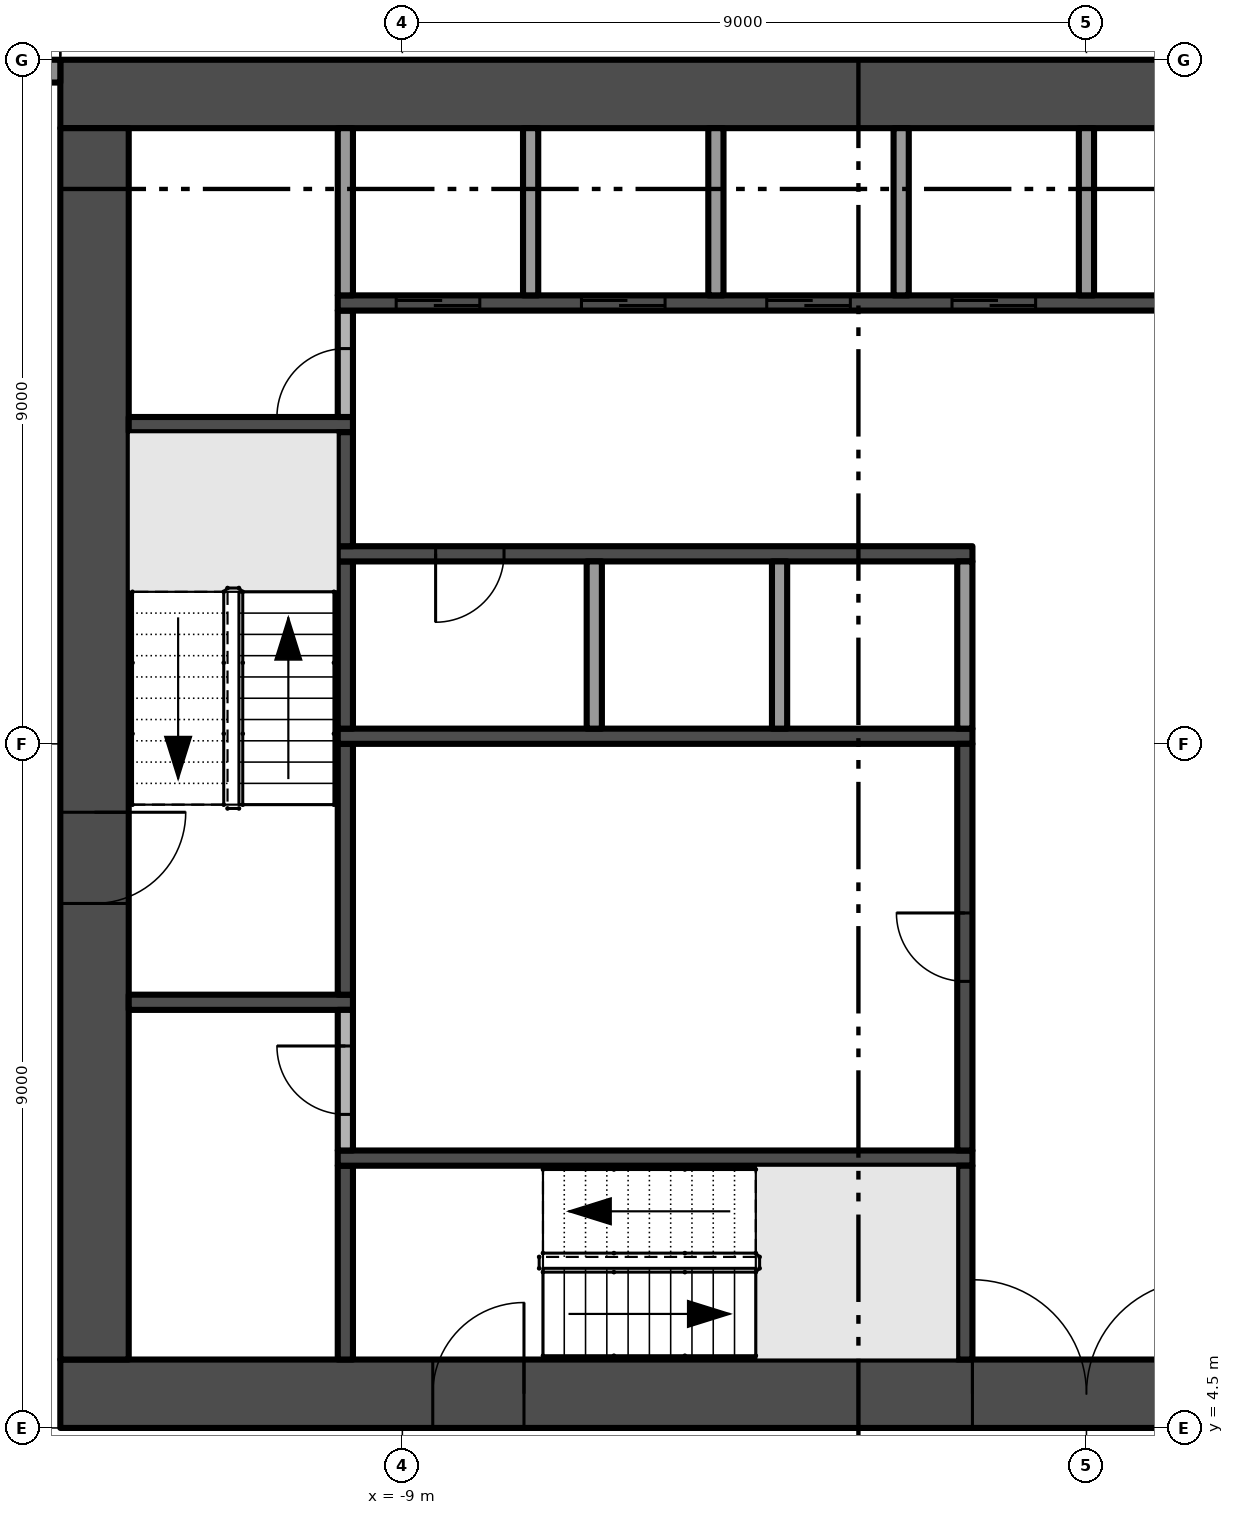
"""IFC4 building model, lengths in metres.
Left out: names, types, materials, properties, quantities, classifications, styles, units other than length and angle.
Written with IfcOpenShell. Run it as: python <this file> out.ifc"""

import sys

from ifc_helpers import new_model, si_unit, direction, frame, frame_2d, origin, place, context, subcontext, project, spatial, rectangle, extrude, element, fill, save


model = new_model("IFC4")
c1 = context("Model", 3, precision=1e-05, world=origin(), true_north=direction((0.0, 1.0)))
c2 = subcontext(c1, "Body", "Model", "MODEL_VIEW")
j1 = project(units=[si_unit("LENGTHUNIT", "METRE"), si_unit("PLANEANGLEUNIT", "RADIAN")], contexts=[c1])
p1 = place(None, origin())
s1 = spatial("IfcSite", under=j1, at=p1, CompositionType="ELEMENT")
p2 = place(p1, origin())
s2 = spatial("IfcBuilding", under=s1, at=p2, CompositionType="ELEMENT")
p3 = place(p2, frame((0.0, 0.0, 77.0)))
s3 = spatial("IfcBuildingStorey", under=s2, at=p3, CompositionType="ELEMENT", Elevation=77.0)
p4 = place(p3, frame((-13.5, 4.95, -0.3), z_axis=(0.0, 0.0, 1.0), x_axis=(1.0, 0.0, 0.0)))
e1 = element("IfcWall", 1, at=p4, inside=s3, PredefinedType="SHEAR", context=c2, shape_type="SweptSolid", body=[
    extrude(rectangle(XDim=27.0, YDim=0.9, at=frame_2d((13.5, 0.0))), origin(), (0.0, 0.0, 1.0), 3.8),
])
p5 = place(p4, frame((12.0, 0.0, 0.3)))
e2 = element("IfcOpeningElement", 2, at=p5, cuts=e1, PredefinedType="OPENING", context=c2, shape_type="SweptSolid", body=[
    extrude(rectangle(XDim=3.0, YDim=2.4, at=frame_2d((1.5, 1.2))), frame((0.0, 0.46, 0.0), z_axis=(0.0, -1.0, 0.0), x_axis=(1.0, 0.0, 0.0)), (0.0, 0.0, 1.0), 0.92),
])
p6 = place(p4, frame((4.9, 0.0, 0.3)))
e3 = element("IfcOpeningElement", 3, at=p6, cuts=e1, PredefinedType="OPENING", context=c2, shape_type="SweptSolid", body=[
    extrude(rectangle(XDim=1.2, YDim=2.2, at=frame_2d((0.6, 1.1))), frame((0.0, 0.46, 0.0), z_axis=(0.0, -1.0, 0.0), x_axis=(1.0, 0.0, 0.0)), (0.0, 0.0, 1.0), 0.92),
])
p7 = place(p4, frame((20.75, 0.0, 0.3)))
e4 = element("IfcOpeningElement", 4, at=p7, cuts=e1, PredefinedType="OPENING", context=c2, shape_type="SweptSolid", body=[
    extrude(rectangle(XDim=1.5, YDim=2.2, at=frame_2d((0.75, 1.1))), frame((0.0, 0.46, 0.0), z_axis=(0.0, -1.0, 0.0), x_axis=(1.0, 0.0, 0.0)), (0.0, 0.0, 1.0), 0.92),
])
p8 = place(p4, frame((17.4, 0.0, 0.3)))
e5 = element("IfcOpeningElement", 5, at=p8, cuts=e1, PredefinedType="OPENING", context=c2, shape_type="SweptSolid", body=[
    extrude(rectangle(XDim=1.2, YDim=2.2, at=frame_2d((0.6, 1.1))), frame((0.0, 0.46, 0.0), z_axis=(0.0, -1.0, 0.0), x_axis=(1.0, 0.0, 0.0)), (0.0, 0.0, 1.0), 0.92),
])
p9 = place(p3, frame((13.5, 22.05, -0.3), z_axis=(0.0, 0.0, 1.0), x_axis=(-1.0, 0.0, 0.0)))
e6 = element("IfcWall", 6, at=p9, inside=s3, PredefinedType="SHEAR", context=c2, shape_type="SweptSolid", body=[
    extrude(rectangle(XDim=27.0, YDim=0.9, at=frame_2d((13.5, 0.0))), origin(), (0.0, 0.0, 1.0), 3.8),
])
p10 = place(p3, frame((-13.05, 21.6, -0.3), z_axis=(0.0, 0.0, 1.0), x_axis=(0.0, -1.0, 0.0)))
e7 = element("IfcWall", 7, at=p10, inside=s3, PredefinedType="SHEAR", context=c2, shape_type="SweptSolid", body=[
    extrude(rectangle(XDim=16.2, YDim=0.9, at=frame_2d((8.1, 0.0))), origin(), (0.0, 0.0, 1.0), 3.8),
])
p11 = place(p10, frame((9.0, 0.0, 0.3)))
e8 = element("IfcOpeningElement", 8, at=p11, cuts=e7, PredefinedType="OPENING", context=c2, shape_type="SweptSolid", body=[
    extrude(rectangle(XDim=1.2, YDim=2.2, at=frame_2d((0.6, 1.1))), frame((0.0, 0.46, 0.0), z_axis=(0.0, -1.0, 0.0), x_axis=(1.0, 0.0, 0.0)), (0.0, 0.0, 1.0), 0.92),
])
p12 = place(p3, frame((-17.325, 22.35, 0.0), z_axis=(0.0, 0.0, 1.0), x_axis=(1.0, 0.0, 0.0)))
e9 = element("IfcWall", 9, at=p12, inside=s3, PredefinedType="SOLIDWALL", context=c2, shape_type="SweptSolid", body=[
    extrude(rectangle(XDim=3.825, YDim=0.3, at=frame_2d((1.913, 0.0))), origin(), (0.0, 0.0, 1.0), 3.5),
])
p13 = place(p12, frame((0.325, 0.0, 0.0)))
e10 = element("IfcOpeningElement", 10, at=p13, cuts=e9, PredefinedType="OPENING", context=c2, shape_type="SweptSolid", body=[
    extrude(rectangle(XDim=2.725, YDim=2.4, at=frame_2d((1.363, 1.2))), frame((0.0, 0.16, 0.0), z_axis=(0.0, -1.0, 0.0), x_axis=(1.0, 0.0, 0.0)), (0.0, 0.0, 1.0), 0.32),
])
for number, where, z_axis, x_axis in (
    (11, (-12.6, 10.1, 0.0), (0.0, 0.0, 1.0), (1.0, 0.0, 0.0)),
    (12, (-12.6, 17.7, 0.0), (0.0, 0.0, 1.0), (1.0, 0.0, 0.0)),
):
    element("IfcWall", number, at=place(p3, frame(where, z_axis=z_axis, x_axis=x_axis)), inside=s3, PredefinedType="SHEAR", context=c2, shape_type="SweptSolid", body=[
        extrude(rectangle(XDim=2.95, YDim=0.2, at=frame_2d((1.475, 0.0))), origin(), (0.0, 0.0, 1.0), 3.5),
    ])
p14 = place(p3, frame((-9.75, 5.4, 0.0), z_axis=(0.0, 0.0, 1.0), x_axis=(0.0, 1.0, 0.0)))
e13 = element("IfcWall", 13, at=p14, inside=s3, PredefinedType="SHEAR", context=c2, shape_type="SweptSolid", body=[
    extrude(rectangle(XDim=2.55, YDim=0.2, at=frame_2d((1.275, 0.0))), origin(), (0.0, 0.0, 1.0), 3.5),
])
p15 = place(p3, frame((-9.85, 8.05, 0.0), z_axis=(0.0, 0.0, 1.0), x_axis=(1.0, 0.0, 0.0)))
e14 = element("IfcWall", 14, at=p15, inside=s3, PredefinedType="SHEAR", context=c2, shape_type="SweptSolid", body=[
    extrude(rectangle(XDim=8.35, YDim=0.2, at=frame_2d((4.175, 0.0))), origin(), (0.0, 0.0, 1.0), 3.5),
])
p16 = place(p3, frame((-9.75, 8.15, 0.0), z_axis=(0.0, 0.0, 1.0), x_axis=(0.0, 1.0, 0.0)))
e15 = element("IfcWall", 15, at=p16, inside=s3, PredefinedType="PARTITIONING", context=c2, shape_type="SweptSolid", body=[
    extrude(rectangle(XDim=1.85, YDim=0.2, at=frame_2d((0.925, 0.0))), origin(), (0.0, 0.0, 1.0), 3.5),
])
p17 = place(p16, frame((0.475, 0.0, 0.0)))
e16 = element("IfcOpeningElement", 16, at=p17, cuts=e15, PredefinedType="OPENING", context=c2, shape_type="SweptSolid", body=[
    extrude(rectangle(XDim=0.9, YDim=2.1, at=frame_2d((0.45, 1.05))), frame((0.0, 0.11, 0.0), z_axis=(0.0, -1.0, 0.0), x_axis=(1.0, 0.0, 0.0)), (0.0, 0.0, 1.0), 0.22),
])
p18 = place(p3, frame((-9.75, 10.2, 0.0), z_axis=(0.0, 0.0, 1.0), x_axis=(0.0, 1.0, 0.0)))
e17 = element("IfcWall", 17, at=p18, inside=s3, PredefinedType="SHEAR", context=c2, shape_type="SweptSolid", body=[
    extrude(rectangle(XDim=3.3, YDim=0.2, at=frame_2d((1.65, 0.0))), origin(), (0.0, 0.0, 1.0), 3.5),
])
p19 = place(p3, frame((-9.85, 13.6, 0.0), z_axis=(0.0, 0.0, 1.0), x_axis=(1.0, 0.0, 0.0)))
e18 = element("IfcWall", 18, at=p19, inside=s3, PredefinedType="SHEAR", context=c2, shape_type="SweptSolid", body=[
    extrude(rectangle(XDim=8.35, YDim=0.2, at=frame_2d((4.175, 0.0))), origin(), (0.0, 0.0, 1.0), 3.5),
])
p20 = place(p3, frame((-9.75, 13.7, 0.0), z_axis=(0.0, 0.0, 1.0), x_axis=(0.0, 1.0, 0.0)))
e19 = element("IfcWall", 19, at=p20, inside=s3, PredefinedType="SHEAR", context=c2, shape_type="SweptSolid", body=[
    extrude(rectangle(XDim=2.2, YDim=0.2, at=frame_2d((1.1, 0.0))), origin(), (0.0, 0.0, 1.0), 3.5),
])
p21 = place(p3, frame((-1.5, 16.0, 0.0), z_axis=(0.0, 0.0, 1.0), x_axis=(-1.0, 0.0, 0.0)))
e20 = element("IfcWall", 20, at=p21, inside=s3, PredefinedType="SHEAR", context=c2, shape_type="SweptSolid", body=[
    extrude(rectangle(XDim=8.35, YDim=0.2, at=frame_2d((4.175, 0.0))), origin(), (0.0, 0.0, 1.0), 3.5),
])
p22 = place(p21, frame((6.162, 0.0, 0.0)))
e21 = element("IfcOpeningElement", 21, at=p22, cuts=e20, PredefinedType="OPENING", context=c2, shape_type="SweptSolid", body=[
    extrude(rectangle(XDim=0.9, YDim=2.1, at=frame_2d((0.45, 1.05))), frame((0.0, 0.11, 0.0), z_axis=(0.0, -1.0, 0.0), x_axis=(1.0, 0.0, 0.0)), (0.0, 0.0, 1.0), 0.22),
])
p23 = place(p3, frame((-9.75, 16.1, 0.0), z_axis=(0.0, 0.0, 1.0), x_axis=(0.0, 1.0, 0.0)))
e22 = element("IfcWall", 22, at=p23, inside=s3, PredefinedType="SHEAR", context=c2, shape_type="SweptSolid", body=[
    extrude(rectangle(XDim=1.5, YDim=0.2, at=frame_2d((0.75, 0.0))), origin(), (0.0, 0.0, 1.0), 3.5),
])
p24 = place(p3, frame((-9.75, 17.8, 0.0), z_axis=(0.0, 0.0, 1.0), x_axis=(0.0, 1.0, 0.0)))
e23 = element("IfcWall", 23, at=p24, inside=s3, PredefinedType="PARTITIONING", context=c2, shape_type="SweptSolid", body=[
    extrude(rectangle(XDim=1.4, YDim=0.2, at=frame_2d((0.7, 0.0))), origin(), (0.0, 0.0, 1.0), 3.5),
])
p25 = place(p24, origin())
e24 = element("IfcOpeningElement", 24, at=p25, cuts=e23, PredefinedType="OPENING", context=c2, shape_type="SweptSolid", body=[
    extrude(rectangle(XDim=0.9, YDim=2.1, at=frame_2d((0.45, 1.05))), frame((0.0, 0.11, 0.0), z_axis=(0.0, -1.0, 0.0), x_axis=(1.0, 0.0, 0.0)), (0.0, 0.0, 1.0), 0.22),
])
p26 = place(p3, frame((-9.85, 19.3, 0.0), z_axis=(0.0, 0.0, 1.0), x_axis=(1.0, 0.0, 0.0)))
e25 = element("IfcWall", 25, at=p26, inside=s3, PredefinedType="SHEAR", context=c2, shape_type="SweptSolid", body=[
    extrude(rectangle(XDim=19.7, YDim=0.2, at=frame_2d((9.85, 0.0))), origin(), (0.0, 0.0, 1.0), 3.5),
])
p27 = place(p26, frame((0.769, 0.0, 0.0)))
e26 = element("IfcOpeningElement", 26, at=p27, cuts=e25, PredefinedType="OPENING", context=c2, shape_type="SweptSolid", body=[
    extrude(rectangle(XDim=1.1, YDim=2.1, at=frame_2d((0.55, 1.05))), frame((0.0, 0.11, 0.0), z_axis=(0.0, -1.0, 0.0), x_axis=(1.0, 0.0, 0.0)), (0.0, 0.0, 1.0), 0.22),
])
p28 = place(p26, frame((3.206, 0.0, 0.0)))
e27 = element("IfcOpeningElement", 27, at=p28, cuts=e25, PredefinedType="OPENING", context=c2, shape_type="SweptSolid", body=[
    extrude(rectangle(XDim=1.1, YDim=2.1, at=frame_2d((0.55, 1.05))), frame((0.0, 0.11, 0.0), z_axis=(0.0, -1.0, 0.0), x_axis=(1.0, 0.0, 0.0)), (0.0, 0.0, 1.0), 0.22),
])
p29 = place(p26, frame((5.644, 0.0, 0.0)))
e28 = element("IfcOpeningElement", 28, at=p29, cuts=e25, PredefinedType="OPENING", context=c2, shape_type="SweptSolid", body=[
    extrude(rectangle(XDim=1.1, YDim=2.1, at=frame_2d((0.55, 1.05))), frame((0.0, 0.11, 0.0), z_axis=(0.0, -1.0, 0.0), x_axis=(1.0, 0.0, 0.0)), (0.0, 0.0, 1.0), 0.22),
])
p30 = place(p26, frame((8.081, 0.0, 0.0)))
e29 = element("IfcOpeningElement", 29, at=p30, cuts=e25, PredefinedType="OPENING", context=c2, shape_type="SweptSolid", body=[
    extrude(rectangle(XDim=1.1, YDim=2.1, at=frame_2d((0.55, 1.05))), frame((0.0, 0.11, 0.0), z_axis=(0.0, -1.0, 0.0), x_axis=(1.0, 0.0, 0.0)), (0.0, 0.0, 1.0), 0.22),
])
for number, where, z_axis, x_axis in (
    (30, (-9.75, 19.4, 0.0), (0.0, 0.0, 1.0), (0.0, 1.0, 0.0)),
    (31, (-7.312, 19.4, 0.0), (0.0, 0.0, 1.0), (0.0, 1.0, 0.0)),
    (32, (-6.475, 13.7, 0.0), (0.0, 0.0, 1.0), (0.0, 1.0, 0.0)),
    (33, (-4.875, 19.4, 0.0), (0.0, 0.0, 1.0), (0.0, 1.0, 0.0)),
    (34, (-4.037, 13.7, 0.0), (0.0, 0.0, 1.0), (0.0, 1.0, 0.0)),
    (35, (-2.438, 19.4, 0.0), (0.0, 0.0, 1.0), (0.0, 1.0, 0.0)),
):
    element("IfcWall", number, at=place(p3, frame(where, z_axis=z_axis, x_axis=x_axis)), inside=s3, PredefinedType="PARTITIONING", context=c2, shape_type="SweptSolid", body=[
        extrude(rectangle(XDim=2.2, YDim=0.2, at=frame_2d((1.1, 0.0))), origin(), (0.0, 0.0, 1.0), 3.5),
    ])
p31 = place(p3, frame((-1.6, 5.4, 0.0), z_axis=(0.0, 0.0, 1.0), x_axis=(0.0, 1.0, 0.0)))
e36 = element("IfcWall", 36, at=p31, inside=s3, PredefinedType="SHEAR", context=c2, shape_type="SweptSolid", body=[
    extrude(rectangle(XDim=2.55, YDim=0.2, at=frame_2d((1.275, 0.0))), origin(), (0.0, 0.0, 1.0), 3.5),
])
p32 = place(p3, frame((-1.6, 8.15, 0.0), z_axis=(0.0, 0.0, 1.0), x_axis=(0.0, 1.0, 0.0)))
e37 = element("IfcWall", 37, at=p32, inside=s3, PredefinedType="SHEAR", context=c2, shape_type="SweptSolid", body=[
    extrude(rectangle(XDim=5.35, YDim=0.2, at=frame_2d((2.675, 0.0))), origin(), (0.0, 0.0, 1.0), 3.5),
])
p33 = place(p32, frame((2.225, 0.0, 0.0)))
e38 = element("IfcOpeningElement", 38, at=p33, cuts=e37, PredefinedType="OPENING", context=c2, shape_type="SweptSolid", body=[
    extrude(rectangle(XDim=0.9, YDim=2.1, at=frame_2d((0.45, 1.05))), frame((0.0, 0.11, 0.0), z_axis=(0.0, -1.0, 0.0), x_axis=(1.0, 0.0, 0.0)), (0.0, 0.0, 1.0), 0.22),
])
for number, where, z_axis, x_axis in (
    (39, (-1.6, 13.7, 0.0), (0.0, 0.0, 1.0), (0.0, 1.0, 0.0)),
    (40, (0.0, 19.4, 0.0), (0.0, 0.0, 1.0), (0.0, 1.0, 0.0)),
):
    element("IfcWall", number, at=place(p3, frame(where, z_axis=z_axis, x_axis=x_axis)), inside=s3, PredefinedType="PARTITIONING", context=c2, shape_type="SweptSolid", body=[
        extrude(rectangle(XDim=2.2, YDim=0.2, at=frame_2d((1.1, 0.0))), origin(), (0.0, 0.0, 1.0), 3.5),
    ])
p34 = place(p5, frame((3.0, 0.0, 0.0), z_axis=(0.0, 0.0, 1.0), x_axis=(-1.0, 0.0, 0.0)))
e41 = element("IfcDoor", 41, at=p34, inside=s3, OperationType="DOUBLE_DOOR_SINGLE_SWING", PredefinedType="DOOR", context=c2, shape_type="SweptSolid", body=[
    extrude(rectangle(XDim=3.0, YDim=2.4, at=frame_2d((1.5, 1.2))), frame((0.0, 0.025, 0.0), z_axis=(0.0, -1.0, 0.0), x_axis=(1.0, 0.0, 0.0)), (0.0, 0.0, 1.0), 0.05),
])
fill(e2, e41)
p35 = place(p11, frame((1.2, 0.0, 0.0), z_axis=(0.0, 0.0, 1.0), x_axis=(-1.0, 0.0, 0.0)))
e42 = element("IfcDoor", 42, at=p35, inside=s3, OperationType="SINGLE_SWING_RIGHT", PredefinedType="DOOR", context=c2, shape_type="SweptSolid", body=[
    extrude(rectangle(XDim=1.2, YDim=2.2, at=frame_2d((0.6, 1.1))), frame((0.0, 0.025, 0.0), z_axis=(0.0, -1.0, 0.0), x_axis=(1.0, 0.0, 0.0)), (0.0, 0.0, 1.0), 0.05),
])
fill(e8, e42)
p36 = place(p6, frame((1.2, 0.0, 0.0), z_axis=(0.0, 0.0, 1.0), x_axis=(-1.0, 0.0, 0.0)))
e43 = element("IfcDoor", 43, at=p36, inside=s3, OperationType="SINGLE_SWING_LEFT", PredefinedType="DOOR", context=c2, shape_type="SweptSolid", body=[
    extrude(rectangle(XDim=1.2, YDim=2.2, at=frame_2d((0.6, 1.1))), frame((0.0, 0.025, 0.0), z_axis=(0.0, -1.0, 0.0), x_axis=(1.0, 0.0, 0.0)), (0.0, 0.0, 1.0), 0.05),
])
fill(e3, e43)
p37 = place(p27, origin())
e44 = element("IfcDoor", 44, at=p37, inside=s3, OperationType="SLIDING_TO_LEFT", PredefinedType="DOOR", context=c2, shape_type="SweptSolid", body=[
    extrude(rectangle(XDim=1.1, YDim=2.1, at=frame_2d((0.55, 1.05))), frame((0.0, 0.025, 0.0), z_axis=(0.0, -1.0, 0.0), x_axis=(1.0, 0.0, 0.0)), (0.0, 0.0, 1.0), 0.05),
])
fill(e26, e44)
p38 = place(p28, origin())
e45 = element("IfcDoor", 45, at=p38, inside=s3, OperationType="SLIDING_TO_LEFT", PredefinedType="DOOR", context=c2, shape_type="SweptSolid", body=[
    extrude(rectangle(XDim=1.1, YDim=2.1, at=frame_2d((0.55, 1.05))), frame((0.0, 0.025, 0.0), z_axis=(0.0, -1.0, 0.0), x_axis=(1.0, 0.0, 0.0)), (0.0, 0.0, 1.0), 0.05),
])
fill(e27, e45)
p39 = place(p29, origin())
e46 = element("IfcDoor", 46, at=p39, inside=s3, OperationType="SLIDING_TO_LEFT", PredefinedType="DOOR", context=c2, shape_type="SweptSolid", body=[
    extrude(rectangle(XDim=1.1, YDim=2.1, at=frame_2d((0.55, 1.05))), frame((0.0, 0.025, 0.0), z_axis=(0.0, -1.0, 0.0), x_axis=(1.0, 0.0, 0.0)), (0.0, 0.0, 1.0), 0.05),
])
fill(e28, e46)
p40 = place(p30, origin())
e47 = element("IfcDoor", 47, at=p40, inside=s3, OperationType="SLIDING_TO_LEFT", PredefinedType="DOOR", context=c2, shape_type="SweptSolid", body=[
    extrude(rectangle(XDim=1.1, YDim=2.1, at=frame_2d((0.55, 1.05))), frame((0.0, 0.025, 0.0), z_axis=(0.0, -1.0, 0.0), x_axis=(1.0, 0.0, 0.0)), (0.0, 0.0, 1.0), 0.05),
])
fill(e29, e47)
p41 = place(p33, origin())
e48 = element("IfcDoor", 48, at=p41, inside=s3, OperationType="SINGLE_SWING_RIGHT", PredefinedType="DOOR", context=c2, shape_type="SweptSolid", body=[
    extrude(rectangle(XDim=0.9, YDim=2.1, at=frame_2d((0.45, 1.05))), frame((0.0, 0.025, 0.0), z_axis=(0.0, -1.0, 0.0), x_axis=(1.0, 0.0, 0.0)), (0.0, 0.0, 1.0), 0.05),
])
fill(e38, e48)
p42 = place(p22, origin())
e49 = element("IfcDoor", 49, at=p42, inside=s3, OperationType="SINGLE_SWING_RIGHT", PredefinedType="DOOR", context=c2, shape_type="SweptSolid", body=[
    extrude(rectangle(XDim=0.9, YDim=2.1, at=frame_2d((0.45, 1.05))), frame((0.0, 0.025, 0.0), z_axis=(0.0, -1.0, 0.0), x_axis=(1.0, 0.0, 0.0)), (0.0, 0.0, 1.0), 0.05),
])
fill(e21, e49)
p43 = place(p25, origin())
e50 = element("IfcDoor", 50, at=p43, inside=s3, OperationType="SINGLE_SWING_LEFT", PredefinedType="DOOR", context=c2, shape_type="SweptSolid", body=[
    extrude(rectangle(XDim=0.9, YDim=2.1, at=frame_2d((0.45, 1.05))), frame((0.0, 0.025, 0.0), z_axis=(0.0, -1.0, 0.0), x_axis=(1.0, 0.0, 0.0)), (0.0, 0.0, 1.0), 0.05),
])
fill(e24, e50)
p44 = place(p17, origin())
e51 = element("IfcDoor", 51, at=p44, inside=s3, OperationType="SINGLE_SWING_RIGHT", PredefinedType="DOOR", context=c2, shape_type="SweptSolid", body=[
    extrude(rectangle(XDim=0.9, YDim=2.1, at=frame_2d((0.45, 1.05))), frame((0.0, 0.025, 0.0), z_axis=(0.0, -1.0, 0.0), x_axis=(1.0, 0.0, 0.0)), (0.0, 0.0, 1.0), 0.05),
])
fill(e16, e51)
save(model, sys.argv[1])
